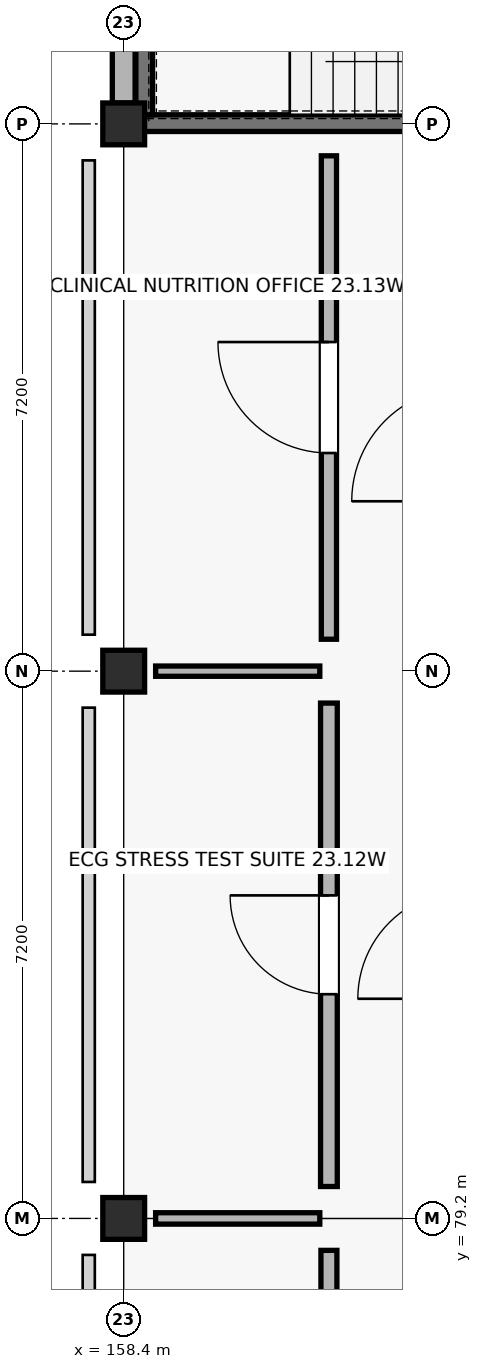
"""IFC4 building model, lengths in metres.
Left out: names, types, materials, properties, quantities, classifications, styles, units other than length and angle.
Written with IfcOpenShell. Run it as: python <this file> out.ifc"""

import sys

from ifc_helpers import new_model, si_unit, direction, frame, frame_2d, origin, origin_2d, place, context, subcontext, project, spatial, rectangle, extrude, element, fill, save


model = new_model("IFC4")
c1 = context("Model", 3, precision=1e-05, world=origin(), true_north=direction((0.0, 1.0)))
c2 = subcontext(c1, "Body", "Model", "MODEL_VIEW")
j1 = project(units=[si_unit("LENGTHUNIT", "METRE"), si_unit("PLANEANGLEUNIT", "RADIAN")], contexts=[c1])
p1 = place(None, origin())
s1 = spatial("IfcSite", under=j1, at=p1, CompositionType="ELEMENT")
p2 = place(p1, origin())
s2 = spatial("IfcBuilding", under=s1, at=p2, CompositionType="ELEMENT")
p3 = place(p2, frame((0.0, 0.0, 13.5)))
s3 = spatial("IfcBuildingStorey", under=s2, at=p3, CompositionType="ELEMENT", Elevation=13.5)
for number, where, z_axis, x_axis in (
    (1, (158.4, 79.2, 0.0), (0.0, 0.0, 1.0), (1.0, 0.0, 0.0)),
    (2, (158.4, 86.4, 0.0), (0.0, 0.0, 1.0), (1.0, 0.0, 0.0)),
    (3, (158.4, 93.6, 0.0), (0.0, 0.0, 1.0), (1.0, 0.0, 0.0)),
):
    element("IfcColumn", number, at=place(p3, frame(where, z_axis=z_axis, x_axis=x_axis)), inside=s3, PredefinedType="COLUMN", context=c2, shape_type="SweptSolid", body=[
        extrude(rectangle(XDim=0.55, YDim=0.55, at=origin_2d()), origin(), (0.0, 0.0, 1.0), 4.05),
    ])
p4 = place(p3, frame((158.4, 100.525, 0.0), z_axis=(0.0, 0.0, 1.0), x_axis=(0.0, -1.0, 0.0)))
e4 = element("IfcWall", 4, at=p4, inside=s3, PredefinedType="STANDARD", context=c2, shape_type="SweptSolid", body=[
    extrude(rectangle(XDim=6.65, YDim=0.3, at=frame_2d((3.325, 0.0))), origin(), (0.0, 0.0, 1.0), 3.24),
])
p5 = place(p3, frame((158.56, 93.61, 0.0), z_axis=(0.0, 0.0, 1.0), x_axis=(1.0, 0.0, 0.0)))
e5 = element("IfcWall", 5, at=p5, inside=s3, PredefinedType="SHEAR", context=c2, shape_type="SweptSolid", body=[
    extrude(rectangle(XDim=6.88, YDim=0.22, at=frame_2d((3.44, 0.0))), origin(), (0.0, 0.0, 1.0), 3.79),
])
p6 = place(p5, frame((5.3, 0.0, 0.0)))
e6 = element("IfcOpeningElement", 6, at=p6, cuts=e5, PredefinedType="OPENING", context=c2, shape_type="SweptSolid", body=[
    extrude(rectangle(XDim=1.15, YDim=2.15, at=frame_2d((0.575, 1.075))), frame((0.0, 0.12, 0.0), z_axis=(0.0, -1.0, 0.0), x_axis=(1.0, 0.0, 0.0)), (0.0, 0.0, 1.0), 0.24),
])
p7 = place(p3, frame((158.67, 93.72, 0.0), z_axis=(0.0, 0.0, 1.0), x_axis=(0.0, 1.0, 0.0)))
e7 = element("IfcWall", 7, at=p7, inside=s3, PredefinedType="SHEAR", context=c2, shape_type="SweptSolid", body=[
    extrude(rectangle(XDim=3.0, YDim=0.22, at=frame_2d((1.5, 0.0))), origin(), (0.0, 0.0, 1.0), 3.79),
])
p8 = place(p3, frame((161.1, 72.42, 0.0), z_axis=(0.0, 0.0, 1.0), x_axis=(0.0, 1.0, 0.0)))
e8 = element("IfcWall", 8, at=p8, inside=s3, PredefinedType="PLUMBINGWALL", context=c2, shape_type="SweptSolid", body=[
    extrude(rectangle(XDim=6.36, YDim=0.21, at=frame_2d((3.18, 0.0))), origin(), (0.0, 0.0, 1.0), 2.93),
])
p9 = place(p8, frame((2.53, 0.0, 0.0)))
e9 = element("IfcOpeningElement", 9, at=p9, cuts=e8, PredefinedType="OPENING", context=c2, shape_type="SweptSolid", body=[
    extrude(rectangle(XDim=1.3, YDim=2.09, at=frame_2d((0.65, 1.045))), frame((0.0, 0.115, 0.0), z_axis=(0.0, -1.0, 0.0), x_axis=(1.0, 0.0, 0.0)), (0.0, 0.0, 1.0), 0.23),
])
p10 = place(p3, frame((158.82, 79.2, 0.0), z_axis=(0.0, 0.0, 1.0), x_axis=(1.0, 0.0, 0.0)))
e10 = element("IfcWall", 10, at=p10, inside=s3, PredefinedType="PARTITIONING", context=c2, shape_type="SweptSolid", body=[
    extrude(rectangle(XDim=2.16, YDim=0.15, at=frame_2d((1.08, 0.0))), origin(), (0.0, 0.0, 1.0), 2.93),
])
p11 = place(p3, frame((161.1, 79.62, 0.0), z_axis=(0.0, 0.0, 1.0), x_axis=(0.0, 1.0, 0.0)))
e11 = element("IfcWall", 11, at=p11, inside=s3, PredefinedType="SOLIDWALL", context=c2, shape_type="SweptSolid", body=[
    extrude(rectangle(XDim=6.36, YDim=0.22, at=frame_2d((3.18, 0.0))), origin(), (0.0, 0.0, 1.0), 2.93),
])
p12 = place(p11, frame((2.53, 0.0, 0.0)))
e12 = element("IfcOpeningElement", 12, at=p12, cuts=e11, PredefinedType="OPENING", context=c2, shape_type="SweptSolid", body=[
    extrude(rectangle(XDim=1.3, YDim=2.15, at=frame_2d((0.65, 1.075))), frame((0.0, 0.12, 0.0), z_axis=(0.0, -1.0, 0.0), x_axis=(1.0, 0.0, 0.0)), (0.0, 0.0, 1.0), 0.24),
])
p13 = place(p3, frame((158.82, 86.4, 0.0), z_axis=(0.0, 0.0, 1.0), x_axis=(1.0, 0.0, 0.0)))
e13 = element("IfcWall", 13, at=p13, inside=s3, PredefinedType="PARTITIONING", context=c2, shape_type="SweptSolid", body=[
    extrude(rectangle(XDim=2.16, YDim=0.135, at=frame_2d((1.08, 0.0))), origin(), (0.0, 0.0, 1.0), 2.93),
])
p14 = place(p3, frame((161.1, 86.82, 0.0), z_axis=(0.0, 0.0, 1.0), x_axis=(0.0, 1.0, 0.0)))
e14 = element("IfcWall", 14, at=p14, inside=s3, PredefinedType="SOLIDWALL", context=c2, shape_type="SweptSolid", body=[
    extrude(rectangle(XDim=6.36, YDim=0.2, at=frame_2d((3.18, 0.0))), origin(), (0.0, 0.0, 1.0), 2.93),
])
p15 = place(p14, frame((2.45, 0.0, 0.0)))
e15 = element("IfcOpeningElement", 15, at=p15, cuts=e14, PredefinedType="OPENING", context=c2, shape_type="SweptSolid", body=[
    extrude(rectangle(XDim=1.46, YDim=2.09, at=frame_2d((0.73, 1.045))), frame((0.0, 0.11, 0.0), z_axis=(0.0, -1.0, 0.0), x_axis=(1.0, 0.0, 0.0)), (0.0, 0.0, 1.0), 0.22),
])
p16 = place(p12, origin())
e16 = element("IfcDoor", 16, at=p16, inside=s3, OperationType="SINGLE_SWING_RIGHT", PredefinedType="DOOR", context=c2, shape_type="SweptSolid", body=[
    extrude(rectangle(XDim=1.3, YDim=2.15, at=frame_2d((0.65, 1.075))), frame((0.0, 0.025, 0.0), z_axis=(0.0, -1.0, 0.0), x_axis=(1.0, 0.0, 0.0)), (0.0, 0.0, 1.0), 0.05),
])
fill(e12, e16)
p17 = place(p15, origin())
e17 = element("IfcDoor", 17, at=p17, inside=s3, OperationType="SINGLE_SWING_RIGHT", PredefinedType="DOOR", context=c2, shape_type="SweptSolid", body=[
    extrude(rectangle(XDim=1.46, YDim=2.09, at=frame_2d((0.73, 1.045))), frame((0.0, 0.025, 0.0), z_axis=(0.0, -1.0, 0.0), x_axis=(1.0, 0.0, 0.0)), (0.0, 0.0, 1.0), 0.05),
])
fill(e15, e17)
save(model, sys.argv[1])
